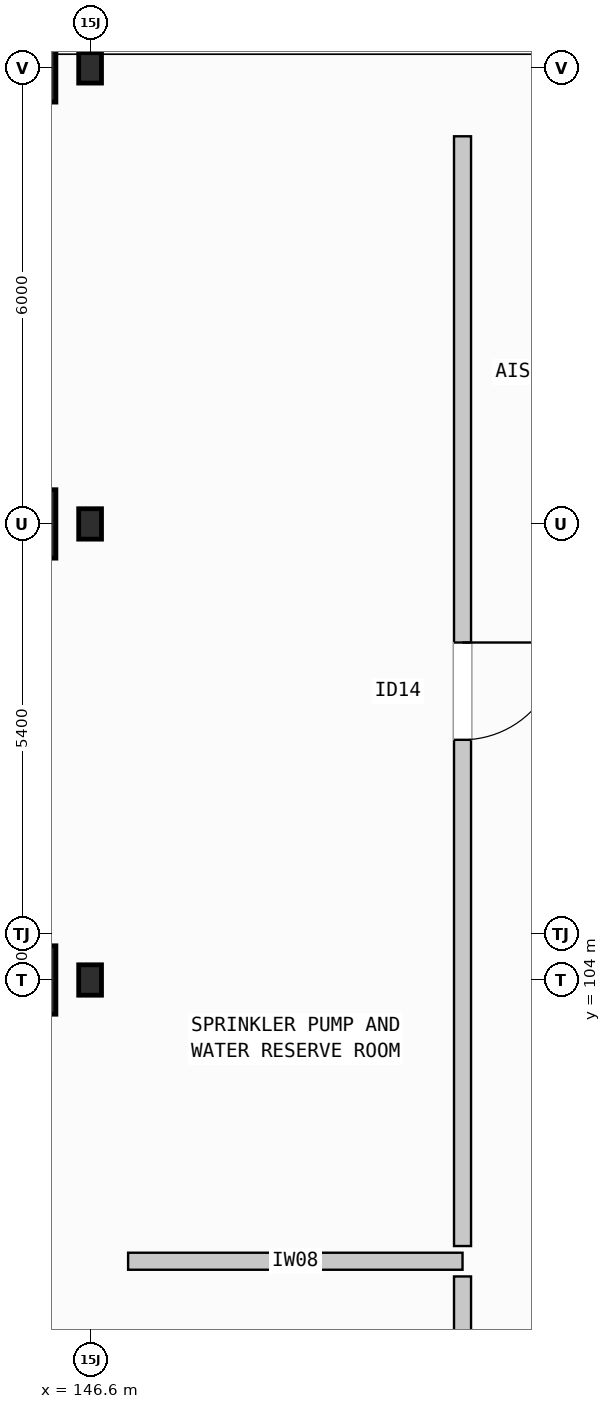
"""IFC4 building model, lengths in metres.
Left out: names, types, materials, properties, quantities, classifications, styles, units other than length and angle.
Written with IfcOpenShell. Run it as: python <this file> out.ifc"""

import sys

from ifc_helpers import new_model, si_unit, direction, frame, frame_2d, origin, origin_2d, place, context, subcontext, project, spatial, rectangle, i_section, extrude, element, fill, save


model = new_model("IFC4")
c1 = context("Model", 3, precision=1e-05, world=origin(), true_north=direction((0.0, 1.0)))
c2 = subcontext(c1, "Body", "Model", "MODEL_VIEW")
j1 = project(units=[si_unit("LENGTHUNIT", "METRE"), si_unit("PLANEANGLEUNIT", "RADIAN")], contexts=[c1])
p1 = place(None, origin())
s1 = spatial("IfcSite", under=j1, at=p1, CompositionType="ELEMENT")
p2 = place(p1, origin())
s2 = spatial("IfcBuilding", under=s1, at=p2, CompositionType="ELEMENT")
p3 = place(p2, frame((0.0, 0.0, -5.4)))
s3 = spatial("IfcBuildingStorey", under=s2, at=p3, CompositionType="ELEMENT", Elevation=-5.4)
for number, where, z_axis, x_axis in (
    (1, (146.0, 104.0, 0.0), (0.0, 0.0, 1.0), (1.0, 0.0, 0.0)),
    (2, (146.0, 110.0, 0.0), (0.0, 0.0, 1.0), (1.0, 0.0, 0.0)),
    (3, (146.0, 116.0, 0.0), (0.0, 0.0, 1.0), (1.0, 0.0, 0.0)),
):
    element("IfcColumn", number, at=place(p3, frame(where, z_axis=z_axis, x_axis=x_axis)), inside=s3, PredefinedType="COLUMN", context=c2, shape_type="SweptSolid", body=[
        extrude(i_section(OverallWidth=0.3, OverallDepth=0.9, WebThickness=0.019, FlangeThickness=0.035, FilletRadius=0.03, at=origin_2d()), origin(), (0.0, 0.0, 1.0), 5.4),
    ])
for number, where, z_axis, x_axis in (
    (4, (146.6, 104.0, 0.0), (0.0, 0.0, 1.0), (1.0, 0.0, 0.0)),
    (5, (146.6, 110.0, 0.0), (0.0, 0.0, 1.0), (1.0, 0.0, 0.0)),
    (6, (146.6, 116.0, 0.0), (0.0, 0.0, 1.0), (1.0, 0.0, 0.0)),
):
    element("IfcColumn", number, at=place(p3, frame(where, z_axis=z_axis, x_axis=x_axis)), inside=s3, PredefinedType="COLUMN", context=c2, shape_type="SweptSolid", body=[
        extrude(i_section(OverallWidth=0.3, OverallDepth=0.4, WebThickness=0.013, FlangeThickness=0.024, FilletRadius=0.027, at=origin_2d()), origin(), (0.0, 0.0, 1.0), 5.4),
    ])
p4 = place(p3, frame((151.5, 85.2, 0.0), z_axis=(0.0, 0.0, 1.0), x_axis=(0.0, 1.0, 0.0)))
e7 = element("IfcWall", 7, at=p4, inside=s3, PredefinedType="PARTITIONING", context=c2, shape_type="SweptSolid", body=[
    extrude(rectangle(XDim=14.9, YDim=0.224, at=frame_2d((7.45, 0.0))), origin(), (0.0, 0.0, 1.0), 4.4),
])
p5 = place(p4, frame((6.81, 0.0, 0.0)))
e8 = element("IfcOpeningElement", 8, at=p5, cuts=e7, PredefinedType="OPENING", context=c2, shape_type="SweptSolid", body=[
    extrude(rectangle(XDim=1.28, YDim=2.24, at=frame_2d((0.64, 1.12))), frame((0.0, 0.122, 0.0), z_axis=(0.0, -1.0, 0.0), x_axis=(1.0, 0.0, 0.0)), (0.0, 0.0, 1.0), 0.244),
])
p6 = place(p3, frame((147.1, 100.3, 0.0), z_axis=(0.0, 0.0, 1.0), x_axis=(1.0, 0.0, 0.0)))
e9 = element("IfcWall", 9, at=p6, inside=s3, PredefinedType="PARTITIONING", context=c2, shape_type="SweptSolid", body=[
    extrude(rectangle(XDim=4.4, YDim=0.224, at=frame_2d((2.2, 0.0))), origin(), (0.0, 0.0, 1.0), 4.4),
])
p7 = place(p3, frame((151.5, 100.5, 0.0), z_axis=(0.0, 0.0, 1.0), x_axis=(0.0, 1.0, 0.0)))
e10 = element("IfcWall", 10, at=p7, inside=s3, PredefinedType="PARTITIONING", context=c2, shape_type="SweptSolid", body=[
    extrude(rectangle(XDim=14.6, YDim=0.224, at=frame_2d((7.3, 0.0))), origin(), (0.0, 0.0, 1.0), 4.4),
])
p8 = place(p7, frame((6.66, 0.0, 0.0)))
e11 = element("IfcOpeningElement", 11, at=p8, cuts=e10, PredefinedType="OPENING", context=c2, shape_type="SweptSolid", body=[
    extrude(rectangle(XDim=1.28, YDim=2.24, at=frame_2d((0.64, 1.12))), frame((0.0, 0.122, 0.0), z_axis=(0.0, -1.0, 0.0), x_axis=(1.0, 0.0, 0.0)), (0.0, 0.0, 1.0), 0.244),
])
p9 = place(p8, frame((1.28, 0.0, 0.0), z_axis=(0.0, 0.0, 1.0), x_axis=(-1.0, 0.0, 0.0)))
e12 = element("IfcDoor", 12, at=p9, inside=s3, OperationType="SINGLE_SWING_LEFT", PredefinedType="DOOR", context=c2, shape_type="SweptSolid", body=[
    extrude(rectangle(XDim=1.28, YDim=2.24, at=frame_2d((0.64, 1.12))), frame((0.0, 0.025, 0.0), z_axis=(0.0, -1.0, 0.0), x_axis=(1.0, 0.0, 0.0)), (0.0, 0.0, 1.0), 0.05),
])
fill(e11, e12)
save(model, sys.argv[1])
